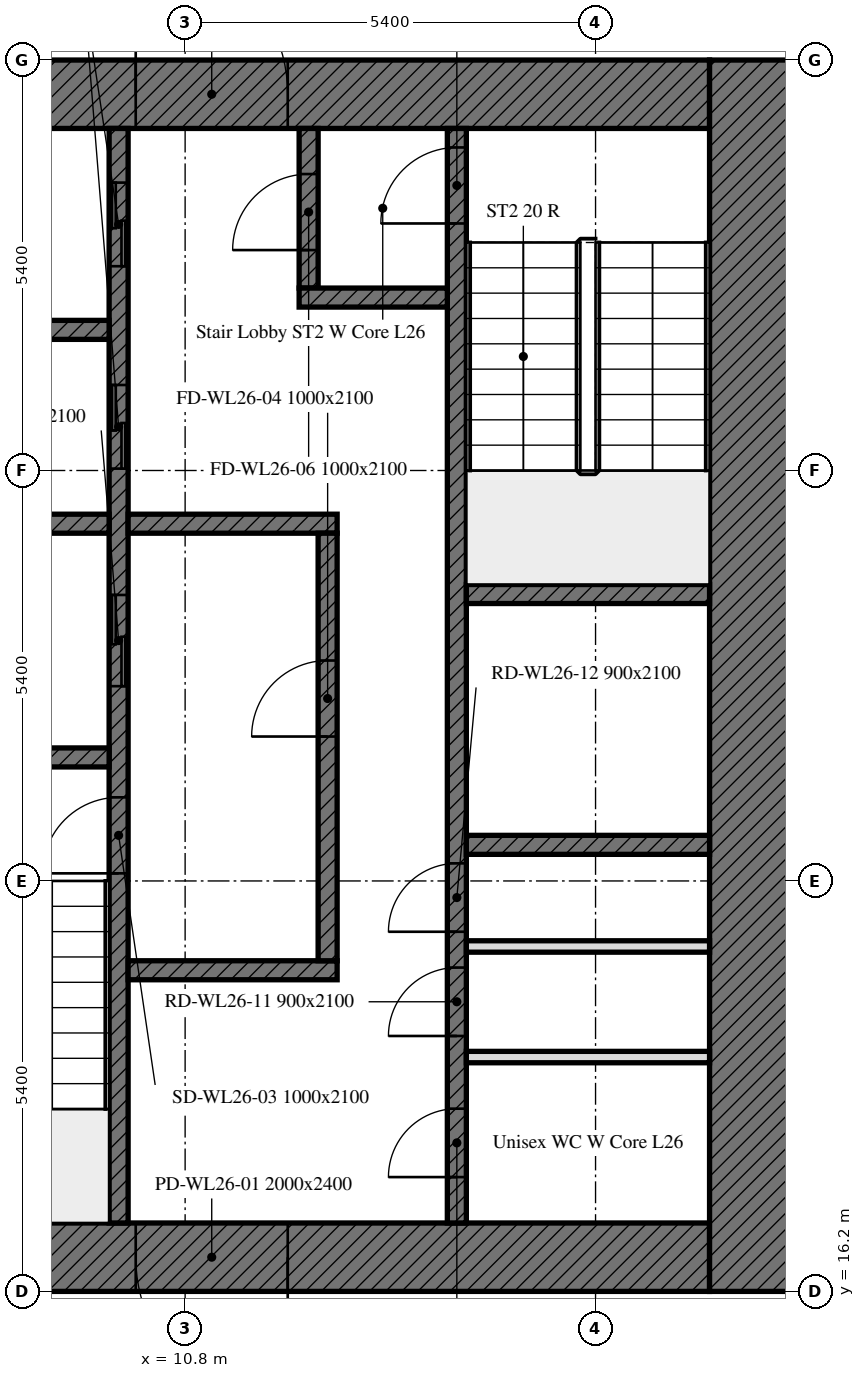
"""IFC4 building model, lengths in metres.
Left out: names, types, materials, properties, quantities, classifications, styles, units other than length and angle.
Written with IfcOpenShell. Run it as: python <this file> out.ifc"""

import sys

from ifc_helpers import new_model, si_unit, direction, frame, frame_2d, origin, place, context, subcontext, project, spatial, rectangle, extrude, element, fill, save


model = new_model("IFC4")
c1 = context("Model", 3, precision=1e-05, world=origin(), true_north=direction((0.0, 1.0)))
c2 = subcontext(c1, "Body", "Model", "MODEL_VIEW")
j1 = project(units=[si_unit("LENGTHUNIT", "METRE"), si_unit("PLANEANGLEUNIT", "RADIAN")], contexts=[c1])
p1 = place(None, origin())
s1 = spatial("IfcSite", under=j1, at=p1, CompositionType="ELEMENT")
p2 = place(p1, origin())
s2 = spatial("IfcBuilding", under=s1, at=p2, CompositionType="ELEMENT")
p3 = place(p2, frame((0.0, 0.0, 110.6)))
s3 = spatial("IfcBuildingStorey", under=s2, at=p3, CompositionType="ELEMENT", Elevation=110.6)
p4 = place(p3, frame((17.7, 16.65, 0.0), z_axis=(0.0, 0.0, 1.0), x_axis=(-1.0, 0.0, 0.0)))
e1 = element("IfcWall", 1, at=p4, inside=s3, PredefinedType="SOLIDWALL", context=c2, shape_type="SweptSolid", body=[
    extrude(rectangle(XDim=11.1, YDim=0.9, at=frame_2d((5.55, 0.0))), origin(), (0.0, 0.0, 1.0), 3.5),
])
p5 = place(p4, frame((5.55, 0.0, 0.0)))
e2 = element("IfcOpeningElement", 2, at=p5, cuts=e1, PredefinedType="OPENING", context=c2, shape_type="SweptSolid", body=[
    extrude(rectangle(XDim=2.0, YDim=2.4, at=frame_2d((1.0, 1.2))), frame((0.0, 0.45, 0.0), z_axis=(0.0, -1.0, 0.0), x_axis=(1.0, 0.0, 0.0)), (0.0, 0.0, 1.0), 0.9),
])
p6 = place(p3, frame((6.6, 31.95, 0.0), z_axis=(0.0, 0.0, 1.0), x_axis=(1.0, 0.0, 0.0)))
e3 = element("IfcWall", 3, at=p6, inside=s3, PredefinedType="SOLIDWALL", context=c2, shape_type="SweptSolid", body=[
    extrude(rectangle(XDim=11.1, YDim=0.9, at=frame_2d((5.55, 0.0))), origin(), (0.0, 0.0, 1.0), 3.5),
])
p7 = place(p6, frame((3.55, 0.0, 0.0)))
e4 = element("IfcOpeningElement", 4, at=p7, cuts=e3, PredefinedType="OPENING", context=c2, shape_type="SweptSolid", body=[
    extrude(rectangle(XDim=2.0, YDim=2.4, at=frame_2d((1.0, 1.2))), frame((0.0, 0.45, 0.0), z_axis=(0.0, -1.0, 0.0), x_axis=(1.0, 0.0, 0.0)), (0.0, 0.0, 1.0), 0.9),
])
p8 = place(p3, frame((18.3, 32.4, 0.0), z_axis=(0.0, 0.0, 1.0), x_axis=(0.0, -1.0, 0.0)))
e5 = element("IfcWall", 5, at=p8, inside=s3, PredefinedType="SOLIDWALL", context=c2, shape_type="SweptSolid", body=[
    extrude(rectangle(XDim=16.2, YDim=1.2, at=frame_2d((8.1, 0.0))), origin(), (0.0, 0.0, 1.0), 3.5),
])
p9 = place(p3, frame((9.925, 17.1, 0.0), z_axis=(0.0, 0.0, 1.0), x_axis=(0.0, 1.0, 0.0)))
e6 = element("IfcWall", 6, at=p9, inside=s3, PredefinedType="SOLIDWALL", context=c2, shape_type="SweptSolid", body=[
    extrude(rectangle(XDim=14.4, YDim=0.25, at=frame_2d((7.2, 0.0))), origin(), (0.0, 0.0, 1.0), 3.5),
])
p10 = place(p9, frame((4.6, 0.0, 0.0)))
e7 = element("IfcOpeningElement", 7, at=p10, cuts=e6, PredefinedType="OPENING", context=c2, shape_type="SweptSolid", body=[
    extrude(rectangle(XDim=1.0, YDim=2.1, at=frame_2d((0.5, 1.05))), frame((0.0, 0.125, 0.0), z_axis=(0.0, -1.0, 0.0), x_axis=(1.0, 0.0, 0.0)), (0.0, 0.0, 1.0), 0.25),
])
p11 = place(p9, frame((7.062, 0.0, 0.0)))
e8 = element("IfcOpeningElement", 8, at=p11, cuts=e6, PredefinedType="OPENING", context=c2, shape_type="SweptSolid", body=[
    extrude(rectangle(XDim=1.2, YDim=2.1, at=frame_2d((0.6, 1.05))), frame((0.0, 0.125, 0.0), z_axis=(0.0, -1.0, 0.0), x_axis=(1.0, 0.0, 0.0)), (0.0, 0.0, 1.0), 0.25),
])
p12 = place(p9, frame((9.925, 0.0, 0.0)))
e9 = element("IfcOpeningElement", 9, at=p12, cuts=e6, PredefinedType="OPENING", context=c2, shape_type="SweptSolid", body=[
    extrude(rectangle(XDim=1.1, YDim=2.1, at=frame_2d((0.55, 1.05))), frame((0.0, 0.125, 0.0), z_axis=(0.0, -1.0, 0.0), x_axis=(1.0, 0.0, 0.0)), (0.0, 0.0, 1.0), 0.25),
])
p13 = place(p9, frame((12.587, 0.0, 0.0)))
e10 = element("IfcOpeningElement", 10, at=p13, cuts=e6, PredefinedType="OPENING", context=c2, shape_type="SweptSolid", body=[
    extrude(rectangle(XDim=1.1, YDim=2.1, at=frame_2d((0.55, 1.05))), frame((0.0, 0.125, 0.0), z_axis=(0.0, -1.0, 0.0), x_axis=(1.0, 0.0, 0.0)), (0.0, 0.0, 1.0), 0.25),
])
p14 = place(p3, frame((14.375, 17.1, 0.0), z_axis=(0.0, 0.0, 1.0), x_axis=(0.0, 1.0, 0.0)))
e11 = element("IfcWall", 11, at=p14, inside=s3, PredefinedType="SOLIDWALL", context=c2, shape_type="SweptSolid", body=[
    extrude(rectangle(XDim=14.4, YDim=0.25, at=frame_2d((7.2, 0.0))), origin(), (0.0, 0.0, 1.0), 3.5),
])
p15 = place(p14, frame((13.15, 0.0, 0.0)))
e12 = element("IfcOpeningElement", 12, at=p15, cuts=e11, PredefinedType="OPENING", context=c2, shape_type="SweptSolid", body=[
    extrude(rectangle(XDim=1.0, YDim=2.1, at=frame_2d((0.5, 1.05))), frame((0.0, 0.125, 0.0), z_axis=(0.0, -1.0, 0.0), x_axis=(1.0, 0.0, 0.0)), (0.0, 0.0, 1.0), 0.25),
])
p16 = place(p14, frame((0.604, 0.0, 0.0)))
e13 = element("IfcOpeningElement", 13, at=p16, cuts=e11, PredefinedType="OPENING", context=c2, shape_type="SweptSolid", body=[
    extrude(rectangle(XDim=0.9, YDim=2.1, at=frame_2d((0.45, 1.05))), frame((0.0, 0.125, 0.0), z_axis=(0.0, -1.0, 0.0), x_axis=(1.0, 0.0, 0.0)), (0.0, 0.0, 1.0), 0.25),
])
p17 = place(p14, frame((2.46, 0.0, 0.0)))
e14 = element("IfcOpeningElement", 14, at=p17, cuts=e11, PredefinedType="OPENING", context=c2, shape_type="SweptSolid", body=[
    extrude(rectangle(XDim=0.9, YDim=2.1, at=frame_2d((0.45, 1.05))), frame((0.0, 0.125, 0.0), z_axis=(0.0, -1.0, 0.0), x_axis=(1.0, 0.0, 0.0)), (0.0, 0.0, 1.0), 0.25),
])
p18 = place(p14, frame((3.832, 0.0, 0.0)))
e15 = element("IfcOpeningElement", 15, at=p18, cuts=e11, PredefinedType="OPENING", context=c2, shape_type="SweptSolid", body=[
    extrude(rectangle(XDim=0.9, YDim=2.1, at=frame_2d((0.45, 1.05))), frame((0.0, 0.125, 0.0), z_axis=(0.0, -1.0, 0.0), x_axis=(1.0, 0.0, 0.0)), (0.0, 0.0, 1.0), 0.25),
])
for number, where, z_axis, x_axis in (
    (16, (6.6, 23.225, 0.0), (0.0, 0.0, 1.0), (1.0, 0.0, 0.0)),
    (17, (14.5, 25.375, 0.0), (0.0, 0.0, 1.0), (1.0, 0.0, 0.0)),
    (18, (14.5, 22.075, 0.0), (0.0, 0.0, 1.0), (1.0, 0.0, 0.0)),
    (19, (6.6, 26.3, 0.0), (0.0, 0.0, 1.0), (1.0, 0.0, 0.0)),
):
    element("IfcWall", number, at=place(p3, frame(where, z_axis=z_axis, x_axis=x_axis)), inside=s3, PredefinedType="SOLIDWALL", context=c2, shape_type="SweptSolid", body=[
        extrude(rectangle(XDim=3.2, YDim=0.25, at=frame_2d((1.6, 0.0))), origin(), (0.0, 0.0, 1.0), 3.5),
    ])
for number, where, z_axis, x_axis in (
    (20, (10.05, 26.3, 0.0), (0.0, 0.0, 1.0), (1.0, 0.0, 0.0)),
    (21, (10.05, 20.425, 0.0), (0.0, 0.0, 1.0), (1.0, 0.0, 0.0)),
):
    element("IfcWall", number, at=place(p3, frame(where, z_axis=z_axis, x_axis=x_axis)), inside=s3, PredefinedType="SOLIDWALL", context=c2, shape_type="SweptSolid", body=[
        extrude(rectangle(XDim=2.75, YDim=0.25, at=frame_2d((1.375, 0.0))), origin(), (0.0, 0.0, 1.0), 3.5),
    ])
p19 = place(p3, frame((12.425, 29.4, 0.0), z_axis=(0.0, 0.0, 1.0), x_axis=(0.0, 1.0, 0.0)))
e22 = element("IfcWall", 22, at=p19, inside=s3, PredefinedType="SOLIDWALL", context=c2, shape_type="SweptSolid", body=[
    extrude(rectangle(XDim=2.1, YDim=0.25, at=frame_2d((1.05, 0.0))), origin(), (0.0, 0.0, 1.0), 3.5),
])
p20 = place(p19, frame((0.5, 0.0, 0.0)))
e23 = element("IfcOpeningElement", 23, at=p20, cuts=e22, PredefinedType="OPENING", context=c2, shape_type="SweptSolid", body=[
    extrude(rectangle(XDim=1.0, YDim=2.1, at=frame_2d((0.5, 1.05))), frame((0.0, 0.125, 0.0), z_axis=(0.0, -1.0, 0.0), x_axis=(1.0, 0.0, 0.0)), (0.0, 0.0, 1.0), 0.25),
])
p21 = place(p3, frame((12.3, 29.275, 0.0), z_axis=(0.0, 0.0, 1.0), x_axis=(1.0, 0.0, 0.0)))
e24 = element("IfcWall", 24, at=p21, inside=s3, PredefinedType="SOLIDWALL", context=c2, shape_type="SweptSolid", body=[
    extrude(rectangle(XDim=1.95, YDim=0.25, at=frame_2d((0.975, 0.0))), origin(), (0.0, 0.0, 1.0), 3.5),
])
p22 = place(p3, frame((12.675, 20.55, 0.0), z_axis=(0.0, 0.0, 1.0), x_axis=(0.0, 1.0, 0.0)))
e25 = element("IfcWall", 25, at=p22, inside=s3, PredefinedType="SOLIDWALL", context=c2, shape_type="SweptSolid", body=[
    extrude(rectangle(XDim=5.625, YDim=0.25, at=frame_2d((2.812, 0.0))), origin(), (0.0, 0.0, 1.0), 3.5),
])
p23 = place(p22, frame((2.95, 0.0, 0.0)))
e26 = element("IfcOpeningElement", 26, at=p23, cuts=e25, PredefinedType="OPENING", context=c2, shape_type="SweptSolid", body=[
    extrude(rectangle(XDim=1.0, YDim=2.1, at=frame_2d((0.5, 1.05))), frame((0.0, 0.125, 0.0), z_axis=(0.0, -1.0, 0.0), x_axis=(1.0, 0.0, 0.0)), (0.0, 0.0, 1.0), 0.25),
])
p24 = place(p3, frame((6.6, 28.85, 0.0), z_axis=(0.0, 0.0, 1.0), x_axis=(1.0, 0.0, 0.0)))
e27 = element("IfcWall", 27, at=p24, inside=s3, PredefinedType="SOLIDWALL", context=c2, shape_type="SweptSolid", body=[
    extrude(rectangle(XDim=3.2, YDim=0.25, at=frame_2d((1.6, 0.0))), origin(), (0.0, 0.0, 1.0), 3.5),
])
for number, where, z_axis, x_axis in (
    (28, (14.5, 19.283, 0.0), (0.0, 0.0, 1.0), (1.0, 0.0, 0.0)),
    (29, (14.5, 20.738, 0.0), (0.0, 0.0, 1.0), (1.0, 0.0, 0.0)),
):
    element("IfcWall", number, at=place(p3, frame(where, z_axis=z_axis, x_axis=x_axis)), inside=s3, PredefinedType="PARTITIONING", context=c2, shape_type="SweptSolid", body=[
        extrude(rectangle(XDim=3.2, YDim=0.15, at=frame_2d((1.6, 0.0))), origin(), (0.0, 0.0, 1.0), 3.5),
    ])
p25 = place(p5, origin())
e30 = element("IfcDoor", 30, at=p25, inside=s3, OperationType="DOUBLE_DOOR_SINGLE_SWING", PredefinedType="DOOR", context=c2, shape_type="SweptSolid", body=[
    extrude(rectangle(XDim=2.0, YDim=2.4, at=frame_2d((1.0, 1.2))), frame((0.0, 0.025, 0.0), z_axis=(0.0, -1.0, 0.0), x_axis=(1.0, 0.0, 0.0)), (0.0, 0.0, 1.0), 0.05),
])
fill(e2, e30)
p26 = place(p7, origin())
e31 = element("IfcDoor", 31, at=p26, inside=s3, OperationType="DOUBLE_DOOR_SINGLE_SWING", PredefinedType="DOOR", context=c2, shape_type="SweptSolid", body=[
    extrude(rectangle(XDim=2.0, YDim=2.4, at=frame_2d((1.0, 1.2))), frame((0.0, 0.025, 0.0), z_axis=(0.0, -1.0, 0.0), x_axis=(1.0, 0.0, 0.0)), (0.0, 0.0, 1.0), 0.05),
])
fill(e4, e31)
p27 = place(p10, origin())
e32 = element("IfcDoor", 32, at=p27, inside=s3, OperationType="SINGLE_SWING_LEFT", PredefinedType="DOOR", context=c2, shape_type="SweptSolid", body=[
    extrude(rectangle(XDim=1.0, YDim=2.1, at=frame_2d((0.5, 1.05))), frame((0.0, 0.025, 0.0), z_axis=(0.0, -1.0, 0.0), x_axis=(1.0, 0.0, 0.0)), (0.0, 0.0, 1.0), 0.05),
])
fill(e7, e32)
p28 = place(p23, origin())
e33 = element("IfcDoor", 33, at=p28, inside=s3, OperationType="SINGLE_SWING_LEFT", PredefinedType="DOOR", context=c2, shape_type="SweptSolid", body=[
    extrude(rectangle(XDim=1.0, YDim=2.1, at=frame_2d((0.5, 1.05))), frame((0.0, 0.025, 0.0), z_axis=(0.0, -1.0, 0.0), x_axis=(1.0, 0.0, 0.0)), (0.0, 0.0, 1.0), 0.05),
])
fill(e26, e33)
p29 = place(p15, origin())
e34 = element("IfcDoor", 34, at=p29, inside=s3, OperationType="SINGLE_SWING_LEFT", PredefinedType="DOOR", context=c2, shape_type="SweptSolid", body=[
    extrude(rectangle(XDim=1.0, YDim=2.1, at=frame_2d((0.5, 1.05))), frame((0.0, 0.025, 0.0), z_axis=(0.0, -1.0, 0.0), x_axis=(1.0, 0.0, 0.0)), (0.0, 0.0, 1.0), 0.05),
])
fill(e12, e34)
p30 = place(p20, origin())
e35 = element("IfcDoor", 35, at=p30, inside=s3, OperationType="SINGLE_SWING_LEFT", PredefinedType="DOOR", context=c2, shape_type="SweptSolid", body=[
    extrude(rectangle(XDim=1.0, YDim=2.1, at=frame_2d((0.5, 1.05))), frame((0.0, 0.025, 0.0), z_axis=(0.0, -1.0, 0.0), x_axis=(1.0, 0.0, 0.0)), (0.0, 0.0, 1.0), 0.05),
])
fill(e23, e35)
p31 = place(p11, origin())
e36 = element("IfcDoor", 36, at=p31, inside=s3, OperationType="DOUBLE_DOOR_SLIDING", PredefinedType="DOOR", context=c2, shape_type="SweptSolid", body=[
    extrude(rectangle(XDim=1.2, YDim=2.1, at=frame_2d((0.6, 1.05))), frame((0.0, 0.025, 0.0), z_axis=(0.0, -1.0, 0.0), x_axis=(1.0, 0.0, 0.0)), (0.0, 0.0, 1.0), 0.05),
])
fill(e8, e36)
p32 = place(p12, origin())
e37 = element("IfcDoor", 37, at=p32, inside=s3, OperationType="DOUBLE_DOOR_SLIDING", PredefinedType="DOOR", context=c2, shape_type="SweptSolid", body=[
    extrude(rectangle(XDim=1.1, YDim=2.1, at=frame_2d((0.55, 1.05))), frame((0.0, 0.025, 0.0), z_axis=(0.0, -1.0, 0.0), x_axis=(1.0, 0.0, 0.0)), (0.0, 0.0, 1.0), 0.05),
])
fill(e9, e37)
p33 = place(p13, origin())
e38 = element("IfcDoor", 38, at=p33, inside=s3, OperationType="DOUBLE_DOOR_SLIDING", PredefinedType="DOOR", context=c2, shape_type="SweptSolid", body=[
    extrude(rectangle(XDim=1.1, YDim=2.1, at=frame_2d((0.55, 1.05))), frame((0.0, 0.025, 0.0), z_axis=(0.0, -1.0, 0.0), x_axis=(1.0, 0.0, 0.0)), (0.0, 0.0, 1.0), 0.05),
])
fill(e10, e38)
p34 = place(p16, origin())
e39 = element("IfcDoor", 39, at=p34, inside=s3, OperationType="SINGLE_SWING_LEFT", PredefinedType="DOOR", context=c2, shape_type="SweptSolid", body=[
    extrude(rectangle(XDim=0.9, YDim=2.1, at=frame_2d((0.45, 1.05))), frame((0.0, 0.025, 0.0), z_axis=(0.0, -1.0, 0.0), x_axis=(1.0, 0.0, 0.0)), (0.0, 0.0, 1.0), 0.05),
])
fill(e13, e39)
p35 = place(p17, origin())
e40 = element("IfcDoor", 40, at=p35, inside=s3, OperationType="SINGLE_SWING_LEFT", PredefinedType="DOOR", context=c2, shape_type="SweptSolid", body=[
    extrude(rectangle(XDim=0.9, YDim=2.1, at=frame_2d((0.45, 1.05))), frame((0.0, 0.025, 0.0), z_axis=(0.0, -1.0, 0.0), x_axis=(1.0, 0.0, 0.0)), (0.0, 0.0, 1.0), 0.05),
])
fill(e14, e40)
p36 = place(p18, origin())
e41 = element("IfcDoor", 41, at=p36, inside=s3, OperationType="SINGLE_SWING_LEFT", PredefinedType="DOOR", context=c2, shape_type="SweptSolid", body=[
    extrude(rectangle(XDim=0.9, YDim=2.1, at=frame_2d((0.45, 1.05))), frame((0.0, 0.025, 0.0), z_axis=(0.0, -1.0, 0.0), x_axis=(1.0, 0.0, 0.0)), (0.0, 0.0, 1.0), 0.05),
])
fill(e15, e41)
save(model, sys.argv[1])
